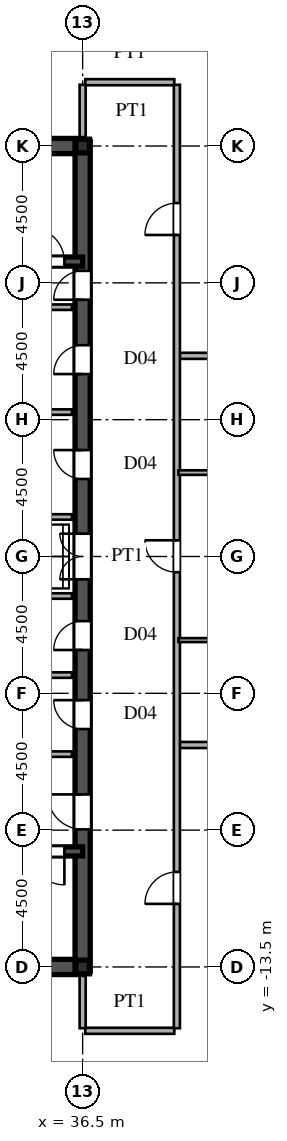
"""IFC4 building model, lengths in metres.
Left out: names, types, materials, properties, quantities, classifications, styles, units other than length and angle.
Written with IfcOpenShell. Run it as: python <this file> out.ifc"""

import sys

from ifc_helpers import new_model, si_unit, direction, frame, frame_2d, origin, origin_2d, place, context, subcontext, project, spatial, rectangle, i_section, extrude, source, transform, mapped, element, fill, save


model = new_model("IFC4")
c1 = context("Model", 3, precision=1e-05, world=origin(), true_north=direction((0.0, 1.0)))
c2 = subcontext(c1, "Body", "Model", "MODEL_VIEW")
j1 = project(units=[si_unit("LENGTHUNIT", "METRE"), si_unit("PLANEANGLEUNIT", "RADIAN")], contexts=[c1])
p1 = place(None, origin())
s1 = spatial("IfcSite", under=j1, at=p1, CompositionType="ELEMENT")
p2 = place(p1, origin())
s2 = spatial("IfcBuilding", under=s1, at=p2, CompositionType="ELEMENT")
p3 = place(p2, frame((0.0, 0.0, 243.15)))
s3 = spatial("IfcBuildingStorey", under=s2, at=p3, CompositionType="ELEMENT", Elevation=243.15)
m1 = source(origin(), c2, "Body", "SweptSolid", [
    extrude(i_section(OverallWidth=0.45, OverallDepth=0.45, WebThickness=0.016, FlangeThickness=0.025, at=origin_2d()), origin(), (0.0, 0.0, 1.0), 3.75),
])
for number, where, z_axis, x_axis in (
    (1, (36.5, -13.5, 0.0), (0.0, 0.0, 1.0), (1.0, 0.0, 0.0)),
    (2, (36.5, 13.5, 0.0), (0.0, 0.0, 1.0), (1.0, 0.0, 0.0)),
):
    element("IfcColumn", number, at=place(p3, frame(where, z_axis=z_axis, x_axis=x_axis)), inside=s3, PredefinedType="COLUMN", context=c2, shape_type="MappedRepresentation", body=[
        mapped(m1, transform((0.0, 0.0, 0.0), scale=1.0)),
    ])
for number, where, z_axis, x_axis in (
    (3, (27.5, -13.5, 0.0), (0.0, 0.0, 1.0), (1.0, 0.0, 0.0)),
    (4, (27.5, 13.5, 0.0), (0.0, 0.0, 1.0), (1.0, 0.0, 0.0)),
):
    element("IfcWall", number, at=place(p3, frame(where, z_axis=z_axis, x_axis=x_axis)), inside=s3, PredefinedType="SHEAR", context=c2, shape_type="SweptSolid", body=[
        extrude(rectangle(XDim=9.0, YDim=0.5, at=frame_2d((4.5, 0.0))), origin(), (0.0, 0.0, 1.0), 3.53),
    ])
p4 = place(p3, frame((36.5, -13.65, 0.0), z_axis=(0.0, 0.0, 1.0), x_axis=(0.0, 1.0, 0.0)))
e5 = element("IfcWall", 5, at=p4, inside=s3, PredefinedType="SHEAR", context=c2, shape_type="SweptSolid", body=[
    extrude(rectangle(XDim=7.15, YDim=0.5, at=frame_2d((3.575, 0.0))), origin(), (0.0, 0.0, 1.0), 3.53),
])
p5 = place(p4, frame((4.675, 0.0, 0.0)))
e6 = element("IfcOpeningElement", 6, at=p5, cuts=e5, PredefinedType="OPENING", context=c2, shape_type="SweptSolid", body=[
    extrude(rectangle(XDim=1.15, YDim=2.2, at=frame_2d((0.575, 1.1))), frame((0.0, 0.26, 0.0), z_axis=(0.0, -1.0, 0.0), x_axis=(1.0, 0.0, 0.0)), (0.0, 0.0, 1.0), 0.52),
])
p6 = place(p3, frame((36.5, -1.3, 0.0), z_axis=(0.0, 0.0, 1.0), x_axis=(0.0, 1.0, 0.0)))
e7 = element("IfcWall", 7, at=p6, inside=s3, PredefinedType="SHEAR", context=c2, shape_type="SweptSolid", body=[
    extrude(rectangle(XDim=2.6, YDim=0.5, at=frame_2d((1.3, 0.0))), origin(), (0.0, 0.0, 1.0), 3.53),
])
p7 = place(p6, frame((0.55, 0.0, 0.0)))
e8 = element("IfcOpeningElement", 8, at=p7, cuts=e7, PredefinedType="OPENING", context=c2, shape_type="SweptSolid", body=[
    extrude(rectangle(XDim=1.5, YDim=2.3, at=frame_2d((0.75, 1.15))), frame((0.0, 0.26, 0.0), z_axis=(0.0, -1.0, 0.0), x_axis=(1.0, 0.0, 0.0)), (0.0, 0.0, 1.0), 0.52),
])
p8 = place(p3, frame((36.5, 8.2, 0.0), z_axis=(0.0, 0.0, 1.0), x_axis=(0.0, 1.0, 0.0)))
e9 = element("IfcWall", 9, at=p8, inside=s3, PredefinedType="SHEAR", context=c2, shape_type="SweptSolid", body=[
    extrude(rectangle(XDim=5.45, YDim=0.5, at=frame_2d((2.725, 0.0))), origin(), (0.0, 0.0, 1.0), 3.53),
])
p9 = place(p8, frame((0.245, 0.0, 0.0)))
e10 = element("IfcOpeningElement", 10, at=p9, cuts=e9, PredefinedType="OPENING", context=c2, shape_type="SweptSolid", body=[
    extrude(rectangle(XDim=0.95, YDim=2.15, at=frame_2d((0.475, 1.075))), frame((0.0, 0.26, 0.0), z_axis=(0.0, -1.0, 0.0), x_axis=(1.0, 0.0, 0.0)), (0.0, 0.0, 1.0), 0.52),
])
p10 = place(p3, frame((36.5, -6.5, 0.0), z_axis=(0.0, 0.0, 1.0), x_axis=(0.0, 1.0, 0.0)))
e11 = element("IfcWall", 11, at=p10, inside=s3, PredefinedType="SHEAR", context=c2, shape_type="SweptSolid", body=[
    extrude(rectangle(XDim=2.6, YDim=0.5, at=frame_2d((1.3, 0.0))), origin(), (0.0, 0.0, 1.0), 3.53),
])
p11 = place(p10, frame((0.825, 0.0, 0.0)))
e12 = element("IfcOpeningElement", 12, at=p11, cuts=e11, PredefinedType="OPENING", context=c2, shape_type="SweptSolid", body=[
    extrude(rectangle(XDim=0.95, YDim=2.15, at=frame_2d((0.475, 1.075))), frame((0.0, 0.26, 0.0), z_axis=(0.0, -1.0, 0.0), x_axis=(1.0, 0.0, 0.0)), (0.0, 0.0, 1.0), 0.52),
])
p12 = place(p3, frame((36.5, -3.9, 0.0), z_axis=(0.0, 0.0, 1.0), x_axis=(0.0, 1.0, 0.0)))
e13 = element("IfcWall", 13, at=p12, inside=s3, PredefinedType="SHEAR", context=c2, shape_type="SweptSolid", body=[
    extrude(rectangle(XDim=2.6, YDim=0.5, at=frame_2d((1.3, 0.0))), origin(), (0.0, 0.0, 1.0), 3.53),
])
p13 = place(p12, frame((0.825, 0.0, 0.0)))
e14 = element("IfcOpeningElement", 14, at=p13, cuts=e13, PredefinedType="OPENING", context=c2, shape_type="SweptSolid", body=[
    extrude(rectangle(XDim=0.95, YDim=2.15, at=frame_2d((0.475, 1.075))), frame((0.0, 0.26, 0.0), z_axis=(0.0, -1.0, 0.0), x_axis=(1.0, 0.0, 0.0)), (0.0, 0.0, 1.0), 0.52),
])
p14 = place(p3, frame((36.5, 1.3, 0.0), z_axis=(0.0, 0.0, 1.0), x_axis=(0.0, 1.0, 0.0)))
e15 = element("IfcWall", 15, at=p14, inside=s3, PredefinedType="SHEAR", context=c2, shape_type="SweptSolid", body=[
    extrude(rectangle(XDim=3.45, YDim=0.5, at=frame_2d((1.725, 0.0))), origin(), (0.0, 0.0, 1.0), 3.53),
])
p15 = place(p14, frame((1.25, 0.0, 0.0)))
e16 = element("IfcOpeningElement", 16, at=p15, cuts=e15, PredefinedType="OPENING", context=c2, shape_type="SweptSolid", body=[
    extrude(rectangle(XDim=0.95, YDim=2.15, at=frame_2d((0.475, 1.075))), frame((0.0, 0.26, 0.0), z_axis=(0.0, -1.0, 0.0), x_axis=(1.0, 0.0, 0.0)), (0.0, 0.0, 1.0), 0.52),
])
p16 = place(p3, frame((36.5, 4.75, 0.0), z_axis=(0.0, 0.0, 1.0), x_axis=(0.0, 1.0, 0.0)))
e17 = element("IfcWall", 17, at=p16, inside=s3, PredefinedType="SHEAR", context=c2, shape_type="SweptSolid", body=[
    extrude(rectangle(XDim=3.45, YDim=0.5, at=frame_2d((1.725, 0.0))), origin(), (0.0, 0.0, 1.0), 3.53),
])
p17 = place(p16, frame((1.25, 0.0, 0.0)))
e18 = element("IfcOpeningElement", 18, at=p17, cuts=e17, PredefinedType="OPENING", context=c2, shape_type="SweptSolid", body=[
    extrude(rectangle(XDim=0.95, YDim=2.15, at=frame_2d((0.475, 1.075))), frame((0.0, 0.26, 0.0), z_axis=(0.0, -1.0, 0.0), x_axis=(1.0, 0.0, 0.0)), (0.0, 0.0, 1.0), 0.52),
])
p18 = place(p3, frame((27.5, -9.7, 0.0), z_axis=(0.0, 0.0, 1.0), x_axis=(1.0, 0.0, 0.0)))
e19 = element("IfcWall", 19, at=p18, inside=s3, PredefinedType="SHEAR", context=c2, shape_type="SweptSolid", body=[
    extrude(rectangle(XDim=9.0, YDim=0.3, at=frame_2d((4.5, 0.0))), origin(), (0.0, 0.0, 1.0), 3.53),
])
p19 = place(p18, frame((7.3, 0.0, 0.0)))
e20 = element("IfcOpeningElement", 20, at=p19, cuts=e19, PredefinedType="OPENING", context=c2, shape_type="SweptSolid", body=[
    extrude(rectangle(XDim=1.1, YDim=2.2, at=frame_2d((0.55, 1.1))), frame((0.0, 0.16, 0.0), z_axis=(0.0, -1.0, 0.0), x_axis=(1.0, 0.0, 0.0)), (0.0, 0.0, 1.0), 0.32),
])
p20 = place(p3, frame((27.5, 9.7, 0.0), z_axis=(0.0, 0.0, 1.0), x_axis=(1.0, 0.0, 0.0)))
e21 = element("IfcWall", 21, at=p20, inside=s3, PredefinedType="SHEAR", context=c2, shape_type="SweptSolid", body=[
    extrude(rectangle(XDim=9.0, YDim=0.3, at=frame_2d((4.5, 0.0))), origin(), (0.0, 0.0, 1.0), 3.53),
])
p21 = place(p20, frame((7.3, 0.0, 0.0)))
e22 = element("IfcOpeningElement", 22, at=p21, cuts=e21, PredefinedType="OPENING", context=c2, shape_type="SweptSolid", body=[
    extrude(rectangle(XDim=1.1, YDim=2.2, at=frame_2d((0.55, 1.1))), frame((0.0, 0.16, 0.0), z_axis=(0.0, -1.0, 0.0), x_axis=(1.0, 0.0, 0.0)), (0.0, 0.0, 1.0), 0.32),
])
for number, where, z_axis, x_axis in (
    (23, (30.45, -6.5, 0.0), (0.0, 0.0, 1.0), (1.0, 0.0, 0.0)),
    (24, (30.45, 8.2, 0.0), (0.0, 0.0, 1.0), (1.0, 0.0, 0.0)),
):
    element("IfcWall", number, at=place(p3, frame(where, z_axis=z_axis, x_axis=x_axis)), inside=s3, PredefinedType="PARTITIONING", context=c2, shape_type="SweptSolid", body=[
        extrude(rectangle(XDim=5.7, YDim=0.18, at=frame_2d((2.85, 0.0))), origin(), (0.0, 0.0, 1.0), 3.53),
    ])
for number, where, z_axis, x_axis in (
    (25, (33.2, -1.3, 0.0), (0.0, 0.0, 1.0), (1.0, 0.0, 0.0)),
    (26, (33.2, 1.3, 0.0), (0.0, 0.0, 1.0), (1.0, 0.0, 0.0)),
    (27, (33.2, -3.9, 0.0), (0.0, 0.0, 1.0), (1.0, 0.0, 0.0)),
    (28, (33.2, 4.75, 0.0), (0.0, 0.0, 1.0), (1.0, 0.0, 0.0)),
):
    element("IfcWall", number, at=place(p3, frame(where, z_axis=z_axis, x_axis=x_axis)), inside=s3, PredefinedType="PARTITIONING", context=c2, shape_type="SweptSolid", body=[
        extrude(rectangle(XDim=2.95, YDim=0.18, at=frame_2d((1.475, 0.0))), origin(), (0.0, 0.0, 1.0), 3.53),
    ])
p22 = place(p3, frame((36.585, -15.6, 0.0), z_axis=(0.0, 0.0, 1.0), x_axis=(1.0, 0.0, 0.0)))
e29 = element("IfcWall", 29, at=p22, inside=s3, PredefinedType="PARTITIONING", context=c2, shape_type="SweptSolid", body=[
    extrude(rectangle(XDim=2.93, YDim=0.2, at=frame_2d((1.465, 0.0))), origin(), (0.0, 0.0, 1.0), 3.53),
])
p23 = place(p3, frame((39.68, -6.2, 0.0), z_axis=(0.0, 0.0, 1.0), x_axis=(1.0, 0.0, 0.0)))
e30 = element("IfcWall", 30, at=p23, inside=s3, PredefinedType="PARTITIONING", context=c2, shape_type="SweptSolid", body=[
    extrude(rectangle(XDim=19.996, YDim=0.2, at=frame_2d((9.998, 0.0))), origin(), (0.0, 0.0, 1.0), 3.53),
])
p24 = place(p3, frame((39.65, -2.75, 0.0), z_axis=(0.0, 0.0, 1.0), x_axis=(1.0, 0.0, 0.0)))
e31 = element("IfcWall", 31, at=p24, inside=s3, PredefinedType="PARTITIONING", context=c2, shape_type="SweptSolid", body=[
    extrude(rectangle(XDim=4.4, YDim=0.13, at=frame_2d((2.2, 0.0))), origin(), (0.0, 0.0, 1.0), 3.53),
])
p25 = place(p24, frame((1.76, 0.0, 0.0)))
e32 = element("IfcOpeningElement", 32, at=p25, cuts=e31, PredefinedType="OPENING", context=c2, shape_type="SweptSolid", body=[
    extrude(rectangle(XDim=0.88, YDim=2.1, at=frame_2d((0.44, 1.05))), frame((0.0, 0.075, 0.0), z_axis=(0.0, -1.0, 0.0), x_axis=(1.0, 0.0, 0.0)), (0.0, 0.0, 1.0), 0.15),
])
p26 = place(p3, frame((39.65, 2.76, 0.0), z_axis=(0.0, 0.0, 1.0), x_axis=(1.0, 0.0, 0.0)))
e33 = element("IfcWall", 33, at=p26, inside=s3, PredefinedType="PARTITIONING", context=c2, shape_type="SweptSolid", body=[
    extrude(rectangle(XDim=4.4, YDim=0.15, at=frame_2d((2.2, 0.0))), origin(), (0.0, 0.0, 1.0), 3.53),
])
p27 = place(p26, frame((1.725, 0.0, 0.0)))
e34 = element("IfcOpeningElement", 34, at=p27, cuts=e33, PredefinedType="OPENING", context=c2, shape_type="SweptSolid", body=[
    extrude(rectangle(XDim=0.95, YDim=2.15, at=frame_2d((0.475, 1.075))), frame((0.0, 0.085, 0.0), z_axis=(0.0, -1.0, 0.0), x_axis=(1.0, 0.0, 0.0)), (0.0, 0.0, 1.0), 0.17),
])
p28 = place(p3, frame((39.68, 6.6, 0.0), z_axis=(0.0, 0.0, 1.0), x_axis=(1.0, 0.0, 0.0)))
e35 = element("IfcWall", 35, at=p28, inside=s3, PredefinedType="PARTITIONING", context=c2, shape_type="SweptSolid", body=[
    extrude(rectangle(XDim=19.33, YDim=0.2, at=frame_2d((9.665, 0.0))), origin(), (0.0, 0.0, 1.0), 3.53),
])
p29 = place(p3, frame((36.585, 15.6, 0.0), z_axis=(0.0, 0.0, 1.0), x_axis=(1.0, 0.0, 0.0)))
e36 = element("IfcWall", 36, at=p29, inside=s3, PredefinedType="PARTITIONING", context=c2, shape_type="SweptSolid", body=[
    extrude(rectangle(XDim=2.93, YDim=0.2, at=frame_2d((1.465, 0.0))), origin(), (0.0, 0.0, 1.0), 3.53),
])
for number, where, z_axis, x_axis in (
    (37, (36.5, -15.515, 0.0), (0.0, 0.0, 1.0), (0.0, 1.0, 0.0)),
    (38, (36.5, 13.755, 0.0), (0.0, 0.0, 1.0), (0.0, 1.0, 0.0)),
):
    element("IfcWall", number, at=place(p3, frame(where, z_axis=z_axis, x_axis=x_axis)), inside=s3, PredefinedType="PARTITIONING", context=c2, shape_type="SweptSolid", body=[
        extrude(rectangle(XDim=1.76, YDim=0.2, at=frame_2d((0.88, 0.0))), origin(), (0.0, 0.0, 1.0), 2.93),
    ])
p30 = place(p3, frame((39.6, -15.515, 0.0), z_axis=(0.0, 0.0, 1.0), x_axis=(0.0, 1.0, 0.0)))
e39 = element("IfcWall", 39, at=p30, inside=s3, PredefinedType="PARTITIONING", context=c2, shape_type="SweptSolid", body=[
    extrude(rectangle(XDim=31.03, YDim=0.2, at=frame_2d((15.515, 0.0))), origin(), (0.0, 0.0, 1.0), 3.53),
])
p31 = place(p30, frame((4.09, 0.0, 0.0)))
e40 = element("IfcOpeningElement", 40, at=p31, cuts=e39, PredefinedType="OPENING", context=c2, shape_type="SweptSolid", body=[
    extrude(rectangle(XDim=1.05, YDim=2.25, at=frame_2d((0.525, 1.125))), frame((0.0, 0.11, 0.0), z_axis=(0.0, -1.0, 0.0), x_axis=(1.0, 0.0, 0.0)), (0.0, 0.0, 1.0), 0.22),
])
p32 = place(p30, frame((14.998, 0.0, 0.0)))
e41 = element("IfcOpeningElement", 41, at=p32, cuts=e39, PredefinedType="OPENING", context=c2, shape_type="SweptSolid", body=[
    extrude(rectangle(XDim=1.05, YDim=2.25, at=frame_2d((0.525, 1.125))), frame((0.0, 0.11, 0.0), z_axis=(0.0, -1.0, 0.0), x_axis=(1.0, 0.0, 0.0)), (0.0, 0.0, 1.0), 0.22),
])
p33 = place(p30, frame((26.09, 0.0, 0.0)))
e42 = element("IfcOpeningElement", 42, at=p33, cuts=e39, PredefinedType="OPENING", context=c2, shape_type="SweptSolid", body=[
    extrude(rectangle(XDim=1.05, YDim=2.25, at=frame_2d((0.525, 1.125))), frame((0.0, 0.11, 0.0), z_axis=(0.0, -1.0, 0.0), x_axis=(1.0, 0.0, 0.0)), (0.0, 0.0, 1.0), 0.22),
])
m2 = source(origin(), c2, "Body", "SweptSolid", [
    extrude(rectangle(XDim=1.15, YDim=2.2, at=frame_2d((0.575, 1.1))), frame((0.0, 0.025, 0.0), z_axis=(0.0, -1.0, 0.0), x_axis=(1.0, 0.0, 0.0)), (0.0, 0.0, 1.0), 0.05),
])
p34 = place(p5, origin())
e43 = element("IfcDoor", 43, at=p34, inside=s3, OperationType="SINGLE_SWING_RIGHT", PredefinedType="DOOR", context=c2, shape_type="MappedRepresentation", body=[
    mapped(m2, transform((0.0, 0.0, 0.0), scale=1.0)),
])
fill(e6, e43)
m3 = source(origin(), c2, "Body", "SweptSolid", [
    extrude(rectangle(XDim=1.5, YDim=2.3, at=frame_2d((0.75, 1.15))), frame((0.0, 0.025, 0.0), z_axis=(0.0, -1.0, 0.0), x_axis=(1.0, 0.0, 0.0)), (0.0, 0.0, 1.0), 0.05),
])
p35 = place(p7, origin())
e44 = element("IfcDoor", 44, at=p35, inside=s3, OperationType="DOUBLE_SWING_LEFT", PredefinedType="DOOR", context=c2, shape_type="MappedRepresentation", body=[
    mapped(m3, transform((0.0, 0.0, 0.0), scale=1.0)),
])
fill(e8, e44)
m4 = source(origin(), c2, "Body", "SweptSolid", [
    extrude(rectangle(XDim=0.95, YDim=2.15, at=frame_2d((0.475, 1.075))), frame((0.0, 0.025, 0.0), z_axis=(0.0, -1.0, 0.0), x_axis=(1.0, 0.0, 0.0)), (0.0, 0.0, 1.0), 0.05),
])
p36 = place(p9, origin())
e45 = element("IfcDoor", 45, at=p36, inside=s3, OperationType="SINGLE_SWING_LEFT", PredefinedType="DOOR", context=c2, shape_type="MappedRepresentation", body=[
    mapped(m4, transform((0.0, 0.0, 0.0), scale=1.0)),
])
fill(e10, e45)
p37 = place(p11, origin())
e46 = element("IfcDoor", 46, at=p37, inside=s3, OperationType="SINGLE_SWING_RIGHT", PredefinedType="DOOR", context=c2, shape_type="MappedRepresentation", body=[
    mapped(m4, transform((0.0, 0.0, 0.0), scale=1.0)),
])
fill(e12, e46)
p38 = place(p13, origin())
e47 = element("IfcDoor", 47, at=p38, inside=s3, OperationType="SINGLE_SWING_LEFT", PredefinedType="DOOR", context=c2, shape_type="MappedRepresentation", body=[
    mapped(m4, transform((0.0, 0.0, 0.0), scale=1.0)),
])
fill(e14, e47)
p39 = place(p15, origin())
e48 = element("IfcDoor", 48, at=p39, inside=s3, OperationType="SINGLE_SWING_RIGHT", PredefinedType="DOOR", context=c2, shape_type="MappedRepresentation", body=[
    mapped(m4, transform((0.0, 0.0, 0.0), scale=1.0)),
])
fill(e16, e48)
p40 = place(p17, origin())
e49 = element("IfcDoor", 49, at=p40, inside=s3, OperationType="SINGLE_SWING_LEFT", PredefinedType="DOOR", context=c2, shape_type="MappedRepresentation", body=[
    mapped(m4, transform((0.0, 0.0, 0.0), scale=1.0)),
])
fill(e18, e49)
m5 = source(origin(), c2, "Body", "SweptSolid", [
    extrude(rectangle(XDim=1.1, YDim=2.2, at=frame_2d((0.55, 1.1))), frame((0.0, 0.025, 0.0), z_axis=(0.0, -1.0, 0.0), x_axis=(1.0, 0.0, 0.0)), (0.0, 0.0, 1.0), 0.05),
])
p41 = place(p19, frame((1.1, 0.0, 0.0), z_axis=(0.0, 0.0, 1.0), x_axis=(-1.0, 0.0, 0.0)))
e50 = element("IfcDoor", 50, at=p41, inside=s3, OperationType="SINGLE_SWING_RIGHT", PredefinedType="DOOR", context=c2, shape_type="MappedRepresentation", body=[
    mapped(m5, transform((0.0, 0.0, 0.0), scale=1.0)),
])
fill(e20, e50)
p42 = place(p21, origin())
e51 = element("IfcDoor", 51, at=p42, inside=s3, OperationType="SINGLE_SWING_LEFT", PredefinedType="DOOR", context=c2, shape_type="MappedRepresentation", body=[
    mapped(m5, transform((0.0, 0.0, 0.0), scale=1.0)),
])
fill(e22, e51)
m6 = source(origin(), c2, "Body", "SweptSolid", [
    extrude(rectangle(XDim=1.05, YDim=2.25, at=frame_2d((0.525, 1.125))), frame((0.0, 0.025, 0.0), z_axis=(0.0, -1.0, 0.0), x_axis=(1.0, 0.0, 0.0)), (0.0, 0.0, 1.0), 0.05),
])
p43 = place(p31, origin())
e52 = element("IfcDoor", 52, at=p43, inside=s3, OperationType="SINGLE_SWING_LEFT", PredefinedType="DOOR", context=c2, shape_type="MappedRepresentation", body=[
    mapped(m6, transform((0.0, 0.0, 0.0), scale=1.0)),
])
fill(e40, e52)
p44 = place(p32, origin())
e53 = element("IfcDoor", 53, at=p44, inside=s3, OperationType="SINGLE_SWING_RIGHT", PredefinedType="DOOR", context=c2, shape_type="MappedRepresentation", body=[
    mapped(m6, transform((0.0, 0.0, 0.0), scale=1.0)),
])
fill(e41, e53)
p45 = place(p33, origin())
e54 = element("IfcDoor", 54, at=p45, inside=s3, OperationType="SINGLE_SWING_LEFT", PredefinedType="DOOR", context=c2, shape_type="MappedRepresentation", body=[
    mapped(m6, transform((0.0, 0.0, 0.0), scale=1.0)),
])
fill(e42, e54)
save(model, sys.argv[1])
